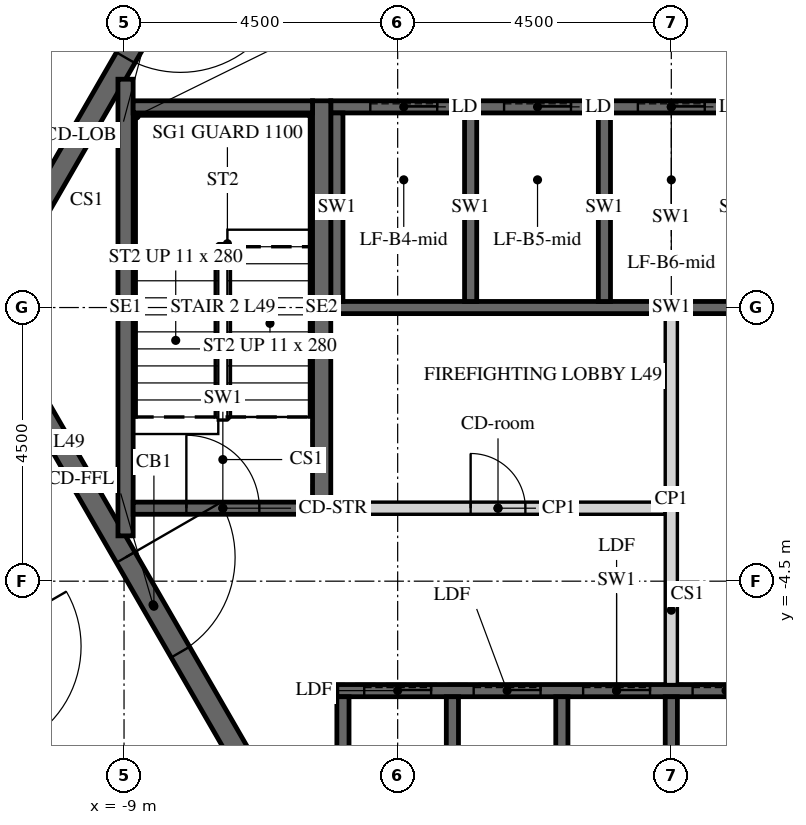
"""IFC4 building model, lengths in metres.
Left out: names, types, materials, properties, quantities, classifications, styles, units other than length and angle.
Written with IfcOpenShell. Run it as: python <this file> out.ifc"""

import sys

from ifc_helpers import new_model, si_unit, direction, frame, frame_2d, origin, place, context, subcontext, project, spatial, polyline, rectangle, outline, extrude, element, fill, save


model = new_model("IFC4")
c1 = context("Model", 3, precision=1e-05, world=origin(), true_north=direction((0.0, 1.0)))
c2 = subcontext(c1, "Body", "Model", "MODEL_VIEW")
j1 = project(units=[si_unit("LENGTHUNIT", "METRE"), si_unit("PLANEANGLEUNIT", "RADIAN")], contexts=[c1])
p1 = place(None, origin())
s1 = spatial("IfcSite", under=j1, at=p1, CompositionType="ELEMENT")
p2 = place(p1, origin())
s2 = spatial("IfcBuilding", under=s1, at=p2, CompositionType="ELEMENT")
p3 = place(p2, frame((0.0, 0.0, 207.3)))
s3 = spatial("IfcBuildingStorey", under=s2, at=p3, CompositionType="ELEMENT", Elevation=207.3)
p4 = place(p3, frame((-7.361, 12.75, -0.15), z_axis=(0.0, 0.0, 1.0), x_axis=(-0.50000571537, -0.866022103989, 0.0)))
e1 = element("IfcWall", 1, at=p4, inside=s3, PredefinedType="SHEAR", context=c2, shape_type="SweptSolid", body=[
    extrude(outline(polyline([(-0.144, -0.25), (14.867, -0.25), (14.578, 0.25), (0.144, 0.25), (-0.144, -0.25)])), origin(), (0.0, 0.0, 1.0), 3.9),
])
p5 = place(p4, frame((6.49, 0.0, 0.15)))
e2 = element("IfcOpeningElement", 2, at=p5, cuts=e1, PredefinedType="OPENING", context=c2, shape_type="SweptSolid", body=[
    extrude(rectangle(XDim=1.8, YDim=2.4, at=frame_2d((0.9, 1.2))), frame((0.0, 0.26, 0.0), z_axis=(0.0, -1.0, 0.0), x_axis=(1.0, 0.0, 0.0)), (0.0, 0.0, 1.0), 0.52),
])
p6 = place(p3, frame((-14.722, 0.0, -0.15), z_axis=(0.0, 0.0, 1.0), x_axis=(0.50000571537, -0.866022103989, 0.0)))
e3 = element("IfcWall", 3, at=p6, inside=s3, PredefinedType="SHEAR", context=c2, shape_type="SweptSolid", body=[
    extrude(outline(polyline([(-0.144, -0.25), (14.867, -0.25), (14.578, 0.25), (0.144, 0.25), (-0.144, -0.25)])), origin(), (0.0, 0.0, 1.0), 3.9),
])
p7 = place(p6, frame((6.432, 0.0, 0.15)))
e4 = element("IfcOpeningElement", 4, at=p7, cuts=e3, PredefinedType="OPENING", context=c2, shape_type="SweptSolid", body=[
    extrude(rectangle(XDim=1.8, YDim=2.4, at=frame_2d((0.9, 1.2))), frame((0.0, 0.26, 0.0), z_axis=(0.0, -1.0, 0.0), x_axis=(1.0, 0.0, 0.0)), (0.0, 0.0, 1.0), 0.52),
])
p8 = place(p3, frame((-5.673, 9.825, -0.15), z_axis=(0.0, 0.0, 1.0), x_axis=(-0.499995046907, -0.866028263435, 0.0)))
e5 = element("IfcWall", 5, at=p8, inside=s3, PredefinedType="SHEAR", context=c2, shape_type="SweptSolid", body=[
    extrude(outline(polyline([(-0.101, -0.175), (11.446, -0.175), (11.244, 0.175), (0.101, 0.175), (-0.101, -0.175)])), origin(), (0.0, 0.0, 1.0), 3.9),
])
p9 = place(p8, frame((4.801, 0.0, 0.15)))
e6 = element("IfcOpeningElement", 6, at=p9, cuts=e5, PredefinedType="OPENING", context=c2, shape_type="SweptSolid", body=[
    extrude(rectangle(XDim=1.8, YDim=2.4, at=frame_2d((0.9, 1.2))), frame((0.0, 0.185, 0.0), z_axis=(0.0, -1.0, 0.0), x_axis=(1.0, 0.0, 0.0)), (0.0, 0.0, 1.0), 0.37),
])
p10 = place(p3, frame((-11.345, 0.0, -0.15), z_axis=(0.0, 0.0, 1.0), x_axis=(0.499995046907, -0.866028263435, 0.0)))
e7 = element("IfcWall", 7, at=p10, inside=s3, PredefinedType="SHEAR", context=c2, shape_type="SweptSolid", body=[
    extrude(outline(polyline([(-0.101, -0.175), (11.446, -0.175), (11.244, 0.175), (0.101, 0.175), (-0.101, -0.175)])), origin(), (0.0, 0.0, 1.0), 3.9),
])
p11 = place(p10, frame((4.744, 0.0, 0.15)))
e8 = element("IfcOpeningElement", 8, at=p11, cuts=e7, PredefinedType="OPENING", context=c2, shape_type="SweptSolid", body=[
    extrude(rectangle(XDim=1.8, YDim=2.4, at=frame_2d((0.9, 1.2))), frame((0.0, 0.185, 0.0), z_axis=(0.0, -1.0, 0.0), x_axis=(1.0, 0.0, 0.0)), (0.0, 0.0, 1.0), 0.37),
])
p12 = place(p3, frame((-5.6, 3.3, -0.25), z_axis=(0.0, 0.0, 1.0), x_axis=(1.0, 0.0, 0.0)))
e9 = element("IfcWall", 9, at=p12, inside=s3, PredefinedType="SHEAR", context=c2, shape_type="SweptSolid", body=[
    extrude(rectangle(XDim=11.2, YDim=0.2, at=frame_2d((5.6, 0.0))), origin(), (0.0, 0.0, 1.0), 3.9),
])
p13 = place(p12, frame((0.65, 0.0, 0.25)))
e10 = element("IfcOpeningElement", 10, at=p13, cuts=e9, PredefinedType="OPENING", context=c2, shape_type="SweptSolid", body=[
    extrude(rectangle(XDim=1.1, YDim=2.1, at=frame_2d((0.55, 1.05))), frame((0.0, 0.11, 0.0), z_axis=(0.0, -1.0, 0.0), x_axis=(1.0, 0.0, 0.0)), (0.0, 0.0, 1.0), 0.22),
])
p14 = place(p12, frame((2.85, 0.0, 0.25)))
e11 = element("IfcOpeningElement", 11, at=p14, cuts=e9, PredefinedType="OPENING", context=c2, shape_type="SweptSolid", body=[
    extrude(rectangle(XDim=1.1, YDim=2.1, at=frame_2d((0.55, 1.05))), frame((0.0, 0.11, 0.0), z_axis=(0.0, -1.0, 0.0), x_axis=(1.0, 0.0, 0.0)), (0.0, 0.0, 1.0), 0.22),
])
p15 = place(p12, frame((5.05, 0.0, 0.25)))
e12 = element("IfcOpeningElement", 12, at=p15, cuts=e9, PredefinedType="OPENING", context=c2, shape_type="SweptSolid", body=[
    extrude(rectangle(XDim=1.1, YDim=2.1, at=frame_2d((0.55, 1.05))), frame((0.0, 0.11, 0.0), z_axis=(0.0, -1.0, 0.0), x_axis=(1.0, 0.0, 0.0)), (0.0, 0.0, 1.0), 0.22),
])
p16 = place(p12, frame((7.25, 0.0, 0.25)))
e13 = element("IfcOpeningElement", 13, at=p16, cuts=e9, PredefinedType="OPENING", context=c2, shape_type="SweptSolid", body=[
    extrude(rectangle(XDim=1.1, YDim=2.1, at=frame_2d((0.55, 1.05))), frame((0.0, 0.11, 0.0), z_axis=(0.0, -1.0, 0.0), x_axis=(1.0, 0.0, 0.0)), (0.0, 0.0, 1.0), 0.22),
])
p17 = place(p12, frame((9.45, 0.0, 0.25)))
e14 = element("IfcOpeningElement", 14, at=p17, cuts=e9, PredefinedType="OPENING", context=c2, shape_type="SweptSolid", body=[
    extrude(rectangle(XDim=1.1, YDim=2.1, at=frame_2d((0.55, 1.05))), frame((0.0, 0.11, 0.0), z_axis=(0.0, -1.0, 0.0), x_axis=(1.0, 0.0, 0.0)), (0.0, 0.0, 1.0), 0.22),
])
p18 = place(p3, frame((-5.6, 0.0, -0.25), z_axis=(0.0, 0.0, 1.0), x_axis=(1.0, 0.0, 0.0)))
e15 = element("IfcWall", 15, at=p18, inside=s3, PredefinedType="SHEAR", context=c2, shape_type="SweptSolid", body=[
    extrude(rectangle(XDim=11.2, YDim=0.2, at=frame_2d((5.6, 0.0))), origin(), (0.0, 0.0, 1.0), 3.9),
])
for number, where, z_axis, x_axis in (
    (16, (-5.5, 0.1, -0.25), (0.0, 0.0, 1.0), (0.0, 1.0, 0.0)),
    (17, (-3.3, 0.1, -0.25), (0.0, 0.0, 1.0), (0.0, 1.0, 0.0)),
    (18, (-1.1, 0.1, -0.25), (0.0, 0.0, 1.0), (0.0, 1.0, 0.0)),
):
    element("IfcWall", number, at=place(p3, frame(where, z_axis=z_axis, x_axis=x_axis)), inside=s3, PredefinedType="SHEAR", context=c2, shape_type="SweptSolid", body=[
        extrude(rectangle(XDim=3.1, YDim=0.2, at=frame_2d((1.55, 0.0))), origin(), (0.0, 0.0, 1.0), 3.9),
    ])
p19 = place(p3, frame((-5.5, -6.3, -0.25), z_axis=(0.0, 0.0, 1.0), x_axis=(1.0, 0.0, 0.0)))
e19 = element("IfcWall", 19, at=p19, inside=s3, PredefinedType="SHEAR", context=c2, shape_type="SweptSolid", body=[
    extrude(rectangle(XDim=9.2, YDim=0.2, at=frame_2d((4.6, 0.0))), origin(), (0.0, 0.0, 1.0), 3.9),
])
p20 = place(p19, frame((0.45, 0.0, 0.25)))
e20 = element("IfcOpeningElement", 20, at=p20, cuts=e19, PredefinedType="OPENING", context=c2, shape_type="SweptSolid", body=[
    extrude(rectangle(XDim=1.1, YDim=2.1, at=frame_2d((0.55, 1.05))), frame((0.0, 0.11, 0.0), z_axis=(0.0, -1.0, 0.0), x_axis=(1.0, 0.0, 0.0)), (0.0, 0.0, 1.0), 0.22),
])
p21 = place(p19, frame((2.25, 0.0, 0.25)))
e21 = element("IfcOpeningElement", 21, at=p21, cuts=e19, PredefinedType="OPENING", context=c2, shape_type="SweptSolid", body=[
    extrude(rectangle(XDim=1.1, YDim=2.1, at=frame_2d((0.55, 1.05))), frame((0.0, 0.11, 0.0), z_axis=(0.0, -1.0, 0.0), x_axis=(1.0, 0.0, 0.0)), (0.0, 0.0, 1.0), 0.22),
])
p22 = place(p19, frame((4.05, 0.0, 0.25)))
e22 = element("IfcOpeningElement", 22, at=p22, cuts=e19, PredefinedType="OPENING", context=c2, shape_type="SweptSolid", body=[
    extrude(rectangle(XDim=1.1, YDim=2.1, at=frame_2d((0.55, 1.05))), frame((0.0, 0.11, 0.0), z_axis=(0.0, -1.0, 0.0), x_axis=(1.0, 0.0, 0.0)), (0.0, 0.0, 1.0), 0.22),
])
p23 = place(p19, frame((5.85, 0.0, 0.25)))
e23 = element("IfcOpeningElement", 23, at=p23, cuts=e19, PredefinedType="OPENING", context=c2, shape_type="SweptSolid", body=[
    extrude(rectangle(XDim=1.1, YDim=2.1, at=frame_2d((0.55, 1.05))), frame((0.0, 0.11, 0.0), z_axis=(0.0, -1.0, 0.0), x_axis=(1.0, 0.0, 0.0)), (0.0, 0.0, 1.0), 0.22),
])
p24 = place(p19, frame((7.65, 0.0, 0.25)))
e24 = element("IfcOpeningElement", 24, at=p24, cuts=e19, PredefinedType="OPENING", context=c2, shape_type="SweptSolid", body=[
    extrude(rectangle(XDim=1.1, YDim=2.1, at=frame_2d((0.55, 1.05))), frame((0.0, 0.11, 0.0), z_axis=(0.0, -1.0, 0.0), x_axis=(1.0, 0.0, 0.0)), (0.0, 0.0, 1.0), 0.22),
])
for number, where, z_axis, x_axis in (
    (25, (-5.4, -9.3, -0.25), (0.0, 0.0, 1.0), (0.0, 1.0, 0.0)),
    (26, (-3.6, -9.3, -0.25), (0.0, 0.0, 1.0), (0.0, 1.0, 0.0)),
    (27, (-1.8, -9.3, -0.25), (0.0, 0.0, 1.0), (0.0, 1.0, 0.0)),
    (28, (0.0, -9.3, -0.25), (0.0, 0.0, 1.0), (0.0, 1.0, 0.0)),
):
    element("IfcWall", number, at=place(p3, frame(where, z_axis=z_axis, x_axis=x_axis)), inside=s3, PredefinedType="SHEAR", context=c2, shape_type="SweptSolid", body=[
        extrude(rectangle(XDim=2.9, YDim=0.2, at=frame_2d((1.45, 0.0))), origin(), (0.0, 0.0, 1.0), 3.9),
    ])
p25 = place(p3, frame((-5.6, -3.3, 0.0), z_axis=(0.0, 0.0, 1.0), x_axis=(1.0, 0.0, 0.0)))
e29 = element("IfcWall", 29, at=p25, inside=s3, PredefinedType="PARTITIONING", context=c2, shape_type="SweptSolid", body=[
    extrude(rectangle(XDim=5.5, YDim=0.2, at=frame_2d((2.75, 0.0))), origin(), (0.0, 0.0, 1.0), 3.65),
])
p26 = place(p25, frame((2.3, 0.0, 0.0)))
e30 = element("IfcOpeningElement", 30, at=p26, cuts=e29, PredefinedType="OPENING", context=c2, shape_type="SweptSolid", body=[
    extrude(rectangle(XDim=0.9, YDim=2.1, at=frame_2d((0.45, 1.05))), frame((0.0, 0.11, 0.0), z_axis=(0.0, -1.0, 0.0), x_axis=(1.0, 0.0, 0.0)), (0.0, 0.0, 1.0), 0.22),
])
p27 = place(p3, frame((0.0, -6.2, 0.0), z_axis=(0.0, 0.0, 1.0), x_axis=(0.0, 1.0, 0.0)))
e31 = element("IfcWall", 31, at=p27, inside=s3, PredefinedType="PARTITIONING", context=c2, shape_type="SweptSolid", body=[
    extrude(rectangle(XDim=6.1, YDim=0.2, at=frame_2d((3.05, 0.0))), origin(), (0.0, 0.0, 1.0), 3.65),
])
p28 = place(p3, frame((-5.75, -3.4, -0.25), z_axis=(0.0, 0.0, 1.0), x_axis=(0.0, 1.0, 0.0)))
e32 = element("IfcWall", 32, at=p28, inside=s3, PredefinedType="SHEAR", context=c2, shape_type="SweptSolid", body=[
    extrude(rectangle(XDim=6.8, YDim=0.3, at=frame_2d((3.4, 0.0))), origin(), (0.0, 0.0, 1.0), 3.9),
])
p29 = place(p3, frame((-8.975, -3.755, -0.25), z_axis=(0.0, 0.0, 1.0), x_axis=(0.0, 1.0, 0.0)))
e33 = element("IfcWall", 33, at=p29, inside=s3, PredefinedType="SHEAR", context=c2, shape_type="SweptSolid", body=[
    extrude(rectangle(XDim=7.51, YDim=0.25, at=frame_2d((3.755, 0.0))), origin(), (0.0, 0.0, 1.0), 3.9),
])
p30 = place(p3, frame((-8.85, 3.3, -0.25), z_axis=(0.0, 0.0, 1.0), x_axis=(1.0, 0.0, 0.0)))
e34 = element("IfcWall", 34, at=p30, inside=s3, PredefinedType="SHEAR", context=c2, shape_type="SweptSolid", body=[
    extrude(rectangle(XDim=2.95, YDim=0.2, at=frame_2d((1.475, 0.0))), origin(), (0.0, 0.0, 1.0), 3.9),
])
p31 = place(p3, frame((-8.85, -3.3, -0.25), z_axis=(0.0, 0.0, 1.0), x_axis=(1.0, 0.0, 0.0)))
e35 = element("IfcWall", 35, at=p31, inside=s3, PredefinedType="SHEAR", context=c2, shape_type="SweptSolid", body=[
    extrude(rectangle(XDim=2.95, YDim=0.2, at=frame_2d((1.475, 0.0))), origin(), (0.0, 0.0, 1.0), 3.9),
])
p32 = place(p31, frame((0.875, 0.0, 0.25)))
e36 = element("IfcOpeningElement", 36, at=p32, cuts=e35, PredefinedType="OPENING", context=c2, shape_type="SweptSolid", body=[
    extrude(rectangle(XDim=1.2, YDim=2.4, at=frame_2d((0.6, 1.2))), frame((0.0, 0.11, 0.0), z_axis=(0.0, -1.0, 0.0), x_axis=(1.0, 0.0, 0.0)), (0.0, 0.0, 1.0), 0.22),
])
p33 = place(p3, frame((-8.673, 14.978, 0.0), z_axis=(0.0, 0.0, 1.0), x_axis=(-0.500009245501, -0.866020065826, 0.0)))
e37 = element("IfcWall", 37, at=p33, inside=s3, PredefinedType="PARTITIONING", context=c2, shape_type="SweptSolid", body=[
    extrude(rectangle(XDim=13.976, YDim=0.15, at=frame_2d((6.988, 0.0))), origin(), (0.0, 0.0, 1.0), 2.988),
])
p34 = place(p33, frame((9.26, 0.0, 0.0)))
e38 = element("IfcOpeningElement", 38, at=p34, cuts=e37, PredefinedType="OPENING", context=c2, shape_type="SweptSolid", body=[
    extrude(rectangle(XDim=1.0, YDim=2.1, at=frame_2d((0.5, 1.05))), frame((0.0, 0.085, 0.0), z_axis=(0.0, -1.0, 0.0), x_axis=(1.0, 0.0, 0.0)), (0.0, 0.0, 1.0), 0.17),
])
p35 = place(p3, frame((-15.094, -3.856, 0.0), z_axis=(0.0, 0.0, 1.0), x_axis=(0.500006037985, -0.866021917724, 0.0)))
e39 = element("IfcWall", 39, at=p35, inside=s3, PredefinedType="PARTITIONING", context=c2, shape_type="SweptSolid", body=[
    extrude(rectangle(XDim=12.867, YDim=0.15, at=frame_2d((6.434, 0.0))), origin(), (0.0, 0.0, 1.0), 2.988),
])
p36 = place(p35, frame((1.225, 0.0, 0.0)))
e40 = element("IfcOpeningElement", 40, at=p36, cuts=e39, PredefinedType="OPENING", context=c2, shape_type="SweptSolid", body=[
    extrude(rectangle(XDim=1.0, YDim=2.1, at=frame_2d((0.5, 1.05))), frame((0.0, 0.085, 0.0), z_axis=(0.0, -1.0, 0.0), x_axis=(1.0, 0.0, 0.0)), (0.0, 0.0, 1.0), 0.17),
])
p37 = place(p35, frame((8.025, 0.0, 0.0)))
e41 = element("IfcOpeningElement", 41, at=p37, cuts=e39, PredefinedType="OPENING", context=c2, shape_type="SweptSolid", body=[
    extrude(rectangle(XDim=1.0, YDim=2.1, at=frame_2d((0.5, 1.05))), frame((0.0, 0.085, 0.0), z_axis=(0.0, -1.0, 0.0), x_axis=(1.0, 0.0, 0.0)), (0.0, 0.0, 1.0), 0.17),
])
p38 = place(p35, frame((11.717, 0.0, 0.0)))
e42 = element("IfcOpeningElement", 42, at=p38, cuts=e39, PredefinedType="OPENING", context=c2, shape_type="SweptSolid", body=[
    extrude(rectangle(XDim=1.0, YDim=2.1, at=frame_2d((0.5, 1.05))), frame((0.0, 0.085, 0.0), z_axis=(0.0, -1.0, 0.0), x_axis=(1.0, 0.0, 0.0)), (0.0, 0.0, 1.0), 0.17),
])
p39 = place(p9, origin())
e43 = element("IfcDoor", 43, at=p39, inside=s3, OperationType="DOUBLE_DOOR_SINGLE_SWING", PredefinedType="DOOR", context=c2, shape_type="SweptSolid", body=[
    extrude(rectangle(XDim=1.8, YDim=2.4, at=frame_2d((0.9, 1.2))), frame((0.0, 0.025, 0.0), z_axis=(0.0, -1.0, 0.0), x_axis=(1.0, 0.0, 0.0)), (0.0, 0.0, 1.0), 0.05),
])
fill(e6, e43)
p40 = place(p11, origin())
e44 = element("IfcDoor", 44, at=p40, inside=s3, OperationType="DOUBLE_DOOR_SINGLE_SWING", PredefinedType="DOOR", context=c2, shape_type="SweptSolid", body=[
    extrude(rectangle(XDim=1.8, YDim=2.4, at=frame_2d((0.9, 1.2))), frame((0.0, 0.025, 0.0), z_axis=(0.0, -1.0, 0.0), x_axis=(1.0, 0.0, 0.0)), (0.0, 0.0, 1.0), 0.05),
])
fill(e8, e44)
p41 = place(p26, origin())
e45 = element("IfcDoor", 45, at=p41, inside=s3, OperationType="SINGLE_SWING_LEFT", PredefinedType="DOOR", context=c2, shape_type="SweptSolid", body=[
    extrude(rectangle(XDim=0.9, YDim=2.1, at=frame_2d((0.45, 1.05))), frame((0.0, 0.025, 0.0), z_axis=(0.0, -1.0, 0.0), x_axis=(1.0, 0.0, 0.0)), (0.0, 0.0, 1.0), 0.05),
])
fill(e30, e45)
p42 = place(p32, origin())
e46 = element("IfcDoor", 46, at=p42, inside=s3, OperationType="SINGLE_SWING_LEFT", PredefinedType="DOOR", context=c2, shape_type="SweptSolid", body=[
    extrude(rectangle(XDim=1.2, YDim=2.4, at=frame_2d((0.6, 1.2))), frame((0.0, 0.025, 0.0), z_axis=(0.0, -1.0, 0.0), x_axis=(1.0, 0.0, 0.0)), (0.0, 0.0, 1.0), 0.05),
])
fill(e36, e46)
p43 = place(p13, origin())
e47 = element("IfcDoor", 47, at=p43, inside=s3, OperationType="SLIDING_TO_LEFT", PredefinedType="DOOR", context=c2, shape_type="SweptSolid", body=[
    extrude(rectangle(XDim=1.1, YDim=2.1, at=frame_2d((0.55, 1.05))), frame((0.0, 0.025, 0.0), z_axis=(0.0, -1.0, 0.0), x_axis=(1.0, 0.0, 0.0)), (0.0, 0.0, 1.0), 0.05),
])
fill(e10, e47)
p44 = place(p14, origin())
e48 = element("IfcDoor", 48, at=p44, inside=s3, OperationType="SLIDING_TO_LEFT", PredefinedType="DOOR", context=c2, shape_type="SweptSolid", body=[
    extrude(rectangle(XDim=1.1, YDim=2.1, at=frame_2d((0.55, 1.05))), frame((0.0, 0.025, 0.0), z_axis=(0.0, -1.0, 0.0), x_axis=(1.0, 0.0, 0.0)), (0.0, 0.0, 1.0), 0.05),
])
fill(e11, e48)
p45 = place(p15, origin())
e49 = element("IfcDoor", 49, at=p45, inside=s3, OperationType="SLIDING_TO_LEFT", PredefinedType="DOOR", context=c2, shape_type="SweptSolid", body=[
    extrude(rectangle(XDim=1.1, YDim=2.1, at=frame_2d((0.55, 1.05))), frame((0.0, 0.025, 0.0), z_axis=(0.0, -1.0, 0.0), x_axis=(1.0, 0.0, 0.0)), (0.0, 0.0, 1.0), 0.05),
])
fill(e12, e49)
p46 = place(p20, origin())
e50 = element("IfcDoor", 50, at=p46, inside=s3, OperationType="SLIDING_TO_LEFT", PredefinedType="DOOR", context=c2, shape_type="SweptSolid", body=[
    extrude(rectangle(XDim=1.1, YDim=2.1, at=frame_2d((0.55, 1.05))), frame((0.0, 0.025, 0.0), z_axis=(0.0, -1.0, 0.0), x_axis=(1.0, 0.0, 0.0)), (0.0, 0.0, 1.0), 0.05),
])
fill(e20, e50)
p47 = place(p21, origin())
e51 = element("IfcDoor", 51, at=p47, inside=s3, OperationType="SLIDING_TO_LEFT", PredefinedType="DOOR", context=c2, shape_type="SweptSolid", body=[
    extrude(rectangle(XDim=1.1, YDim=2.1, at=frame_2d((0.55, 1.05))), frame((0.0, 0.025, 0.0), z_axis=(0.0, -1.0, 0.0), x_axis=(1.0, 0.0, 0.0)), (0.0, 0.0, 1.0), 0.05),
])
fill(e21, e51)
p48 = place(p22, origin())
e52 = element("IfcDoor", 52, at=p48, inside=s3, OperationType="SLIDING_TO_LEFT", PredefinedType="DOOR", context=c2, shape_type="SweptSolid", body=[
    extrude(rectangle(XDim=1.1, YDim=2.1, at=frame_2d((0.55, 1.05))), frame((0.0, 0.025, 0.0), z_axis=(0.0, -1.0, 0.0), x_axis=(1.0, 0.0, 0.0)), (0.0, 0.0, 1.0), 0.05),
])
fill(e22, e52)
p49 = place(p23, origin())
e53 = element("IfcDoor", 53, at=p49, inside=s3, OperationType="SLIDING_TO_LEFT", PredefinedType="DOOR", context=c2, shape_type="SweptSolid", body=[
    extrude(rectangle(XDim=1.1, YDim=2.1, at=frame_2d((0.55, 1.05))), frame((0.0, 0.025, 0.0), z_axis=(0.0, -1.0, 0.0), x_axis=(1.0, 0.0, 0.0)), (0.0, 0.0, 1.0), 0.05),
])
fill(e23, e53)
save(model, sys.argv[1])
